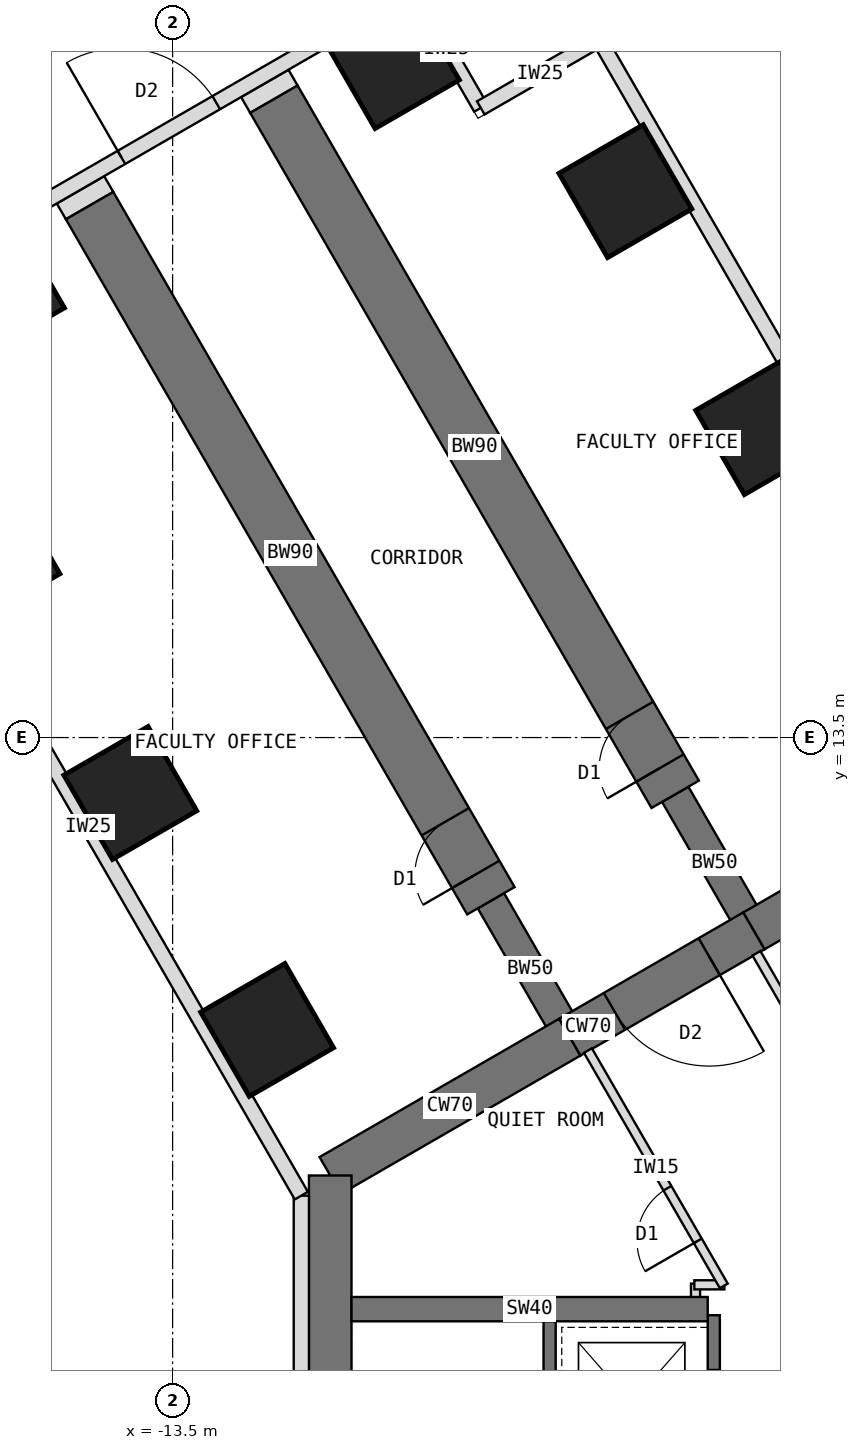
"""IFC4 building model, lengths in metres.
Left out: names, types, materials, properties, quantities, classifications, styles, units other than length and angle.
Written with IfcOpenShell. Run it as: python <this file> out.ifc"""

import sys

from ifc_helpers import new_model, si_unit, direction, frame, frame_2d, origin, origin_2d, place, context, subcontext, project, spatial, rectangle, extrude, element, fill, save


model = new_model("IFC4")
c1 = context("Model", 3, precision=1e-05, world=origin(), true_north=direction((0.0, 1.0)))
c2 = subcontext(c1, "Body", "Model", "MODEL_VIEW")
j1 = project(units=[si_unit("LENGTHUNIT", "METRE"), si_unit("PLANEANGLEUNIT", "RADIAN")], contexts=[c1])
p1 = place(None, origin())
s1 = spatial("IfcSite", under=j1, at=p1, CompositionType="ELEMENT")
p2 = place(p1, origin())
s2 = spatial("IfcBuilding", under=s1, at=p2, CompositionType="ELEMENT")
p3 = place(p2, frame((0.0, 0.0, 5.5)))
s3 = spatial("IfcBuildingStorey", under=s2, at=p3, CompositionType="ELEMENT", Elevation=5.5)
p4 = place(p3, frame((0.0, 12.596, 0.0), z_axis=(0.0, 0.0, 1.0), x_axis=(-0.866011268655, -0.500024481964, 0.0)))
e1 = element("IfcWall", 1, at=p4, inside=s3, PredefinedType="SHEAR", context=c2, shape_type="SweptSolid", body=[
    extrude(rectangle(XDim=4.548, YDim=0.7, at=frame_2d((2.274, 0.0))), origin(), (0.0, 0.0, 1.0), 5.0),
])
p5 = place(p3, frame((-3.939, 10.322, 0.0), z_axis=(0.0, 0.0, 1.0), x_axis=(-0.866019471182, -0.500010275428, 0.0)))
e2 = element("IfcWall", 2, at=p5, inside=s3, PredefinedType="SHEAR", context=c2, shape_type="SweptSolid", body=[
    extrude(rectangle(XDim=3.5, YDim=0.7, at=frame_2d((1.75, 0.0))), origin(), (0.0, 0.0, 1.0), 5.0),
])
p6 = place(p5, frame((0.85, 0.0, 0.0)))
e3 = element("IfcOpeningElement", 3, at=p6, cuts=e2, PredefinedType="OPENING", context=c2, shape_type="SweptSolid", body=[
    extrude(rectangle(XDim=1.8, YDim=2.1, at=frame_2d((0.9, 1.05))), frame((0.0, 0.36, 0.0), z_axis=(0.0, -1.0, 0.0), x_axis=(1.0, 0.0, 0.0)), (0.0, 0.0, 1.0), 0.72),
])
p7 = place(p3, frame((-6.97, 8.572, 0.0), z_axis=(0.0, 0.0, 1.0), x_axis=(-0.866034513004, -0.499984222037, 0.0)))
e4 = element("IfcWall", 4, at=p7, inside=s3, PredefinedType="SHEAR", context=c2, shape_type="SweptSolid", body=[
    extrude(rectangle(XDim=4.548, YDim=0.7, at=frame_2d((2.274, 0.0))), origin(), (0.0, 0.0, 1.0), 5.0),
])
p8 = place(p3, frame((-10.908, 6.298, 0.0), z_axis=(0.0, 0.0, 1.0), x_axis=(0.0, -1.0, 0.0)))
e5 = element("IfcWall", 5, at=p8, inside=s3, PredefinedType="SHEAR", context=c2, shape_type="SweptSolid", body=[
    extrude(rectangle(XDim=12.596, YDim=0.7, at=frame_2d((6.298, 0.0))), origin(), (0.0, 0.0, 1.0), 5.0),
])
p9 = place(p3, frame((-6.97, 8.572, 0.0), z_axis=(0.0, 0.0, 1.0), x_axis=(-0.499988811324, 0.866031863473, 0.0)))
e6 = element("IfcWall", 6, at=p9, inside=s3, PredefinedType="SHEAR", context=c2, shape_type="SweptSolid", body=[
    extrude(rectangle(XDim=2.592, YDim=0.5, at=frame_2d((1.296, 0.0))), origin(), (0.0, 0.0, 1.0), 5.0),
])
p10 = place(p3, frame((-8.266, 10.816, 0.0), z_axis=(0.0, 0.0, 1.0), x_axis=(-0.499996231654, 0.866027579429, 0.0)))
e7 = element("IfcWall", 7, at=p10, inside=s3, PredefinedType="SHEAR", context=c2, shape_type="SweptSolid", body=[
    extrude(rectangle(XDim=13.2, YDim=0.9, at=frame_2d((6.6, 0.0))), origin(), (0.0, 0.0, 1.0), 5.0),
])
p11 = place(p10, frame((0.5, 0.0, 0.0)))
e8 = element("IfcOpeningElement", 8, at=p11, cuts=e7, PredefinedType="OPENING", context=c2, shape_type="SweptSolid", body=[
    extrude(rectangle(XDim=1.0, YDim=2.1, at=frame_2d((0.5, 1.05))), frame((0.0, 0.46, 0.0), z_axis=(0.0, -1.0, 0.0), x_axis=(1.0, 0.0, 0.0)), (0.0, 0.0, 1.0), 0.92),
])
p12 = place(p3, frame((-3.939, 10.322, 0.0), z_axis=(0.0, 0.0, 1.0), x_axis=(-0.499918158782, 0.866072649678, 0.0)))
e9 = element("IfcWall", 9, at=p12, inside=s3, PredefinedType="SHEAR", context=c2, shape_type="SweptSolid", body=[
    extrude(rectangle(XDim=2.592, YDim=0.5, at=frame_2d((1.296, 0.0))), origin(), (0.0, 0.0, 1.0), 5.0),
])
p13 = place(p3, frame((-5.234, 12.566, 0.0), z_axis=(0.0, 0.0, 1.0), x_axis=(-0.500010103361, 0.866019570528, 0.0)))
e10 = element("IfcWall", 10, at=p13, inside=s3, PredefinedType="SHEAR", context=c2, shape_type="SweptSolid", body=[
    extrude(rectangle(XDim=13.2, YDim=0.9, at=frame_2d((6.6, 0.0))), origin(), (0.0, 0.0, 1.0), 5.0),
])
p14 = place(p13, frame((0.5, 0.0, 0.0)))
e11 = element("IfcOpeningElement", 11, at=p14, cuts=e10, PredefinedType="OPENING", context=c2, shape_type="SweptSolid", body=[
    extrude(rectangle(XDim=1.0, YDim=2.1, at=frame_2d((0.5, 1.05))), frame((0.0, 0.46, 0.0), z_axis=(0.0, -1.0, 0.0), x_axis=(1.0, 0.0, 0.0)), (0.0, 0.0, 1.0), 0.92),
])
for number, where, z_axis, x_axis in (
    (12, (-11.946, 8.691, 0.0), (0.0, 0.0, 1.0), (0.866, 0.5, 0.0)),
    (13, (-14.196, 12.588, 0.0), (0.0, 0.0, 1.0), (0.866, 0.5, 0.0)),
    (14, (-3.804, 18.588, 0.0), (0.0, 0.0, 1.0), (0.866, 0.5, 0.0)),
    (15, (-16.446, 16.486, 0.0), (0.0, 0.0, 1.0), (0.866, 0.5, 0.0)),
    (16, (-6.054, 22.486, 0.0), (0.0, 0.0, 1.0), (0.866, 0.5, 0.0)),
    (17, (-16.373, 20.858, 0.0), (0.0, 0.0, 1.0), (0.866, 0.5, 0.0)),
    (18, (-9.877, 24.608, 0.0), (0.0, 0.0, 1.0), (0.866, 0.5, 0.0)),
):
    element("IfcColumn", number, at=place(p3, frame(where, z_axis=z_axis, x_axis=x_axis)), inside=s3, PredefinedType="COLUMN", context=c2, shape_type="SweptSolid", body=[
        extrude(rectangle(XDim=1.6, YDim=1.6, at=origin_2d()), origin(), (0.0, 0.0, 1.0), 5.0),
    ])
p15 = place(p3, frame((-14.865, 22.248, 0.0), z_axis=(0.0, 0.0, 1.0), x_axis=(-0.500426713919, 0.865778900179, 0.0)))
e19 = element("IfcWall", 19, at=p15, inside=s3, PredefinedType="PARTITIONING", context=c2, shape_type="SweptSolid", body=[
    extrude(rectangle(XDim=0.3, YDim=0.9, at=frame_2d((0.15, 0.0))), origin(), (0.0, 0.0, 1.0), 4.65),
])
p16 = place(p3, frame((-11.834, 23.998, 0.0), z_axis=(0.0, 0.0, 1.0), x_axis=(-0.499816412211, 0.866131372301, 0.0)))
e20 = element("IfcWall", 20, at=p16, inside=s3, PredefinedType="PARTITIONING", context=c2, shape_type="SweptSolid", body=[
    extrude(rectangle(XDim=0.3, YDim=0.9, at=frame_2d((0.15, 0.0))), origin(), (0.0, 0.0, 1.0), 4.65),
])
p17 = place(p3, frame((-4.6, 4.0, 0.0), z_axis=(0.0, 0.0, 1.0), x_axis=(0.0, -1.0, 0.0)))
e21 = element("IfcWall", 21, at=p17, inside=s3, PredefinedType="SHEAR", context=c2, shape_type="SweptSolid", body=[
    extrude(rectangle(XDim=8.0, YDim=0.2, at=frame_2d((4.0, 0.0))), origin(), (0.0, 0.0, 1.0), 5.0),
])
p18 = place(p17, frame((6.3, 0.0, 0.0)))
e22 = element("IfcOpeningElement", 22, at=p18, cuts=e21, PredefinedType="OPENING", context=c2, shape_type="SweptSolid", body=[
    extrude(rectangle(XDim=1.2, YDim=2.1, at=frame_2d((0.6, 1.05))), frame((0.0, 0.11, 0.0), z_axis=(0.0, -1.0, 0.0), x_axis=(1.0, 0.0, 0.0)), (0.0, 0.0, 1.0), 0.22),
])
p19 = place(p17, frame((0.9, 0.0, 0.0)))
e23 = element("IfcOpeningElement", 23, at=p19, cuts=e21, PredefinedType="OPENING", context=c2, shape_type="SweptSolid", body=[
    extrude(rectangle(XDim=1.1, YDim=2.2, at=frame_2d((0.55, 1.1))), frame((0.0, 0.11, 0.0), z_axis=(0.0, -1.0, 0.0), x_axis=(1.0, 0.0, 0.0)), (0.0, 0.0, 1.0), 0.22),
])
p20 = place(p3, frame((-7.3, 4.0, 0.0), z_axis=(0.0, 0.0, 1.0), x_axis=(0.0, -1.0, 0.0)))
e24 = element("IfcWall", 24, at=p20, inside=s3, PredefinedType="SHEAR", context=c2, shape_type="SweptSolid", body=[
    extrude(rectangle(XDim=8.0, YDim=0.2, at=frame_2d((4.0, 0.0))), origin(), (0.0, 0.0, 1.0), 5.0),
])
p21 = place(p20, frame((6.7, 0.0, 0.0)))
e25 = element("IfcOpeningElement", 25, at=p21, cuts=e24, PredefinedType="OPENING", context=c2, shape_type="SweptSolid", body=[
    extrude(rectangle(XDim=1.1, YDim=2.1, at=frame_2d((0.55, 1.05))), frame((0.0, 0.11, 0.0), z_axis=(0.0, -1.0, 0.0), x_axis=(1.0, 0.0, 0.0)), (0.0, 0.0, 1.0), 0.22),
])
p22 = place(p3, frame((-4.7, 4.1, 0.0), z_axis=(0.0, 0.0, 1.0), x_axis=(-1.0, 0.0, 0.0)))
e26 = element("IfcWall", 26, at=p22, inside=s3, PredefinedType="SHEAR", context=c2, shape_type="SweptSolid", body=[
    extrude(rectangle(XDim=5.858, YDim=0.4, at=frame_2d((2.929, 0.0))), origin(), (0.0, 0.0, 1.0), 5.0),
])
p23 = place(p3, frame((-4.9, 4.09, 0.0), z_axis=(0.0, 0.0, 1.0), x_axis=(0.0, 1.0, 0.0)))
e27 = element("IfcWall", 27, at=p23, inside=s3, PredefinedType="PARTITIONING", context=c2, shape_type="SweptSolid", body=[
    extrude(rectangle(XDim=0.43, YDim=0.15, at=frame_2d((0.215, 0.0))), origin(), (0.0, 0.0, 1.0), 4.65),
])
p24 = place(p3, frame((-4.92, 4.5, 0.0), z_axis=(0.0, 0.0, 1.0), x_axis=(1.0, 0.0, 0.0)))
e28 = element("IfcWall", 28, at=p24, inside=s3, PredefinedType="PARTITIONING", context=c2, shape_type="SweptSolid", body=[
    extrude(rectangle(XDim=0.494, YDim=0.15, at=frame_2d((0.247, 0.0))), origin(), (0.0, 0.0, 1.0), 4.65),
])
p25 = place(p3, frame((-4.436, 4.483, 0.0), z_axis=(0.0, 0.0, 1.0), x_axis=(-0.500017246033, 0.866015446554, 0.0)))
e29 = element("IfcWall", 29, at=p25, inside=s3, PredefinedType="PARTITIONING", context=c2, shape_type="SweptSolid", body=[
    extrude(rectangle(XDim=4.469, YDim=0.15, at=frame_2d((2.234, 0.0))), origin(), (0.0, 0.0, 1.0), 4.65),
])
p26 = place(p25, frame((0.855, 0.0, 0.0)))
e30 = element("IfcOpeningElement", 30, at=p26, cuts=e29, PredefinedType="OPENING", context=c2, shape_type="SweptSolid", body=[
    extrude(rectangle(XDim=1.0, YDim=2.1, at=frame_2d((0.5, 1.05))), frame((0.0, 0.085, 0.0), z_axis=(0.0, -1.0, 0.0), x_axis=(1.0, 0.0, 0.0)), (0.0, 0.0, 1.0), 0.17),
])
p27 = place(p3, frame((-3.898, 9.952, 0.0), z_axis=(0.0, 0.0, 1.0), x_axis=(0.499999927604, -0.866025445582, 0.0)))
e31 = element("IfcWall", 31, at=p27, inside=s3, PredefinedType="PARTITIONING", context=c2, shape_type="SweptSolid", body=[
    extrude(rectangle(XDim=4.468, YDim=0.15, at=frame_2d((2.234, 0.0))), origin(), (0.0, 0.0, 1.0), 4.65),
])
p28 = place(p27, frame((2.614, 0.0, 0.0)))
e32 = element("IfcOpeningElement", 32, at=p28, cuts=e31, PredefinedType="OPENING", context=c2, shape_type="SweptSolid", body=[
    extrude(rectangle(XDim=1.0, YDim=2.1, at=frame_2d((0.5, 1.05))), frame((0.0, 0.085, 0.0), z_axis=(0.0, -1.0, 0.0), x_axis=(1.0, 0.0, 0.0)), (0.0, 0.0, 1.0), 0.17),
])
p29 = place(p3, frame((-11.383, -5.967, 0.0), z_axis=(0.0, 0.0, 1.0), x_axis=(0.0, 1.0, 0.0)))
e33 = element("IfcWall", 33, at=p29, inside=s3, PredefinedType="STANDARD", context=c2, shape_type="SweptSolid", body=[
    extrude(rectangle(XDim=11.933, YDim=0.25, at=frame_2d((5.967, 0.0))), origin(), (0.0, 0.0, 1.0), 4.65),
])
p30 = place(p3, frame((-11.383, 5.967, 0.0), z_axis=(0.0, 0.0, 1.0), x_axis=(-0.499996367808, 0.866027500821, 0.0)))
e34 = element("IfcWall", 34, at=p30, inside=s3, PredefinedType="STANDARD", context=c2, shape_type="SweptSolid", body=[
    extrude(rectangle(XDim=14.016, YDim=0.25, at=frame_2d((7.008, 0.0))), origin(), (0.0, 0.0, 1.0), 4.65),
])
p31 = place(p3, frame((-17.568, 21.178, 0.0), z_axis=(0.0, 0.0, 1.0), x_axis=(0.866025598446, 0.499999662836, 0.0)))
e35 = element("IfcWall", 35, at=p31, inside=s3, PredefinedType="STANDARD", context=c2, shape_type="SweptSolid", body=[
    extrude(rectangle(XDim=9.25, YDim=0.25, at=frame_2d((4.625, 0.0))), origin(), (0.0, 0.0, 1.0), 4.65),
])
p32 = place(p31, frame((3.725, 0.0, 0.0)))
e36 = element("IfcOpeningElement", 36, at=p32, cuts=e35, PredefinedType="OPENING", context=c2, shape_type="SweptSolid", body=[
    extrude(rectangle(XDim=1.8, YDim=2.1, at=frame_2d((0.9, 1.05))), frame((0.0, 0.135, 0.0), z_axis=(0.0, -1.0, 0.0), x_axis=(1.0, 0.0, 0.0)), (0.0, 0.0, 1.0), 0.27),
])
for number, where, z_axis, x_axis in (
    (37, (-9.557, 25.803, 0.0), (0.0, 0.0, 1.0), (0.5, -0.866, 0.0)),
    (38, (-8.432, 23.855, 0.0), (0.0, 0.0, 1.0), (0.866, 0.5, 0.0)),
):
    element("IfcWall", number, at=place(p3, frame(where, z_axis=z_axis, x_axis=x_axis)), inside=s3, PredefinedType="STANDARD", context=c2, shape_type="SweptSolid", body=[
        extrude(rectangle(XDim=2.25, YDim=0.25, at=frame_2d((1.125, 0.0))), origin(), (0.0, 0.0, 1.0), 4.65),
    ])
p33 = place(p3, frame((-6.484, 24.98, 0.0), z_axis=(0.0, 0.0, 1.0), x_axis=(0.499996367808, -0.866027500821, 0.0)))
e39 = element("IfcWall", 39, at=p33, inside=s3, PredefinedType="STANDARD", context=c2, shape_type="SweptSolid", body=[
    extrude(rectangle(XDim=14.016, YDim=0.25, at=frame_2d((7.008, 0.0))), origin(), (0.0, 0.0, 1.0), 4.65),
])
p34 = place(p6, origin())
e40 = element("IfcDoor", 40, at=p34, inside=s3, OperationType="DOUBLE_DOOR_DOUBLE_SWING", PredefinedType="DOOR", context=c2, shape_type="SweptSolid", body=[
    extrude(rectangle(XDim=1.72, YDim=2.06, at=frame_2d((0.9, 1.03))), frame((0.0, 0.025, 0.0), z_axis=(0.0, -1.0, 0.0), x_axis=(1.0, 0.0, 0.0)), (0.0, 0.0, 1.0), 0.05),
    extrude(rectangle(XDim=0.04, YDim=2.1, at=frame_2d((0.02, 1.05))), frame((0.0, 0.35, 0.0), z_axis=(0.0, -1.0, 0.0), x_axis=(1.0, 0.0, 0.0)), (0.0, 0.0, 1.0), 0.699),
    extrude(rectangle(XDim=0.04, YDim=2.1, at=frame_2d((1.78, 1.05))), frame((0.0, 0.35, 0.0), z_axis=(0.0, -1.0, 0.0), x_axis=(1.0, 0.0, 0.0)), (0.0, 0.0, 1.0), 0.699),
    extrude(rectangle(XDim=1.72, YDim=0.04, at=frame_2d((0.9, 2.08))), frame((0.0, 0.35, 0.0), z_axis=(0.0, -1.0, 0.0), x_axis=(1.0, 0.0, 0.0)), (0.0, 0.0, 1.0), 0.699),
])
fill(e3, e40)
p35 = place(p26, origin())
e41 = element("IfcDoor", 41, at=p35, inside=s3, OperationType="SINGLE_SWING_LEFT", PredefinedType="DOOR", context=c2, shape_type="SweptSolid", body=[
    extrude(rectangle(XDim=1.0, YDim=2.1, at=frame_2d((0.5, 1.05))), frame((0.0, 0.025, 0.0), z_axis=(0.0, -1.0, 0.0), x_axis=(1.0, 0.0, 0.0)), (0.0, 0.0, 1.0), 0.05),
])
fill(e30, e41)
p36 = place(p11, origin())
e42 = element("IfcDoor", 42, at=p36, inside=s3, OperationType="SINGLE_SWING_LEFT", PredefinedType="DOOR", context=c2, shape_type="SweptSolid", body=[
    extrude(rectangle(XDim=0.92, YDim=2.06, at=frame_2d((0.5, 1.03))), frame((0.0, 0.025, 0.0), z_axis=(0.0, -1.0, 0.0), x_axis=(1.0, 0.0, 0.0)), (0.0, 0.0, 1.0), 0.05),
    extrude(rectangle(XDim=0.04, YDim=2.1, at=frame_2d((0.02, 1.05))), frame((0.0, 0.45, 0.0), z_axis=(0.0, -1.0, 0.0), x_axis=(1.0, 0.0, 0.0)), (0.0, 0.0, 1.0), 0.899),
    extrude(rectangle(XDim=0.04, YDim=2.1, at=frame_2d((0.98, 1.05))), frame((0.0, 0.45, 0.0), z_axis=(0.0, -1.0, 0.0), x_axis=(1.0, 0.0, 0.0)), (0.0, 0.0, 1.0), 0.899),
    extrude(rectangle(XDim=0.92, YDim=0.04, at=frame_2d((0.5, 2.08))), frame((0.0, 0.45, 0.0), z_axis=(0.0, -1.0, 0.0), x_axis=(1.0, 0.0, 0.0)), (0.0, 0.0, 1.0), 0.899),
])
fill(e8, e42)
p37 = place(p14, origin())
e43 = element("IfcDoor", 43, at=p37, inside=s3, OperationType="SINGLE_SWING_LEFT", PredefinedType="DOOR", context=c2, shape_type="SweptSolid", body=[
    extrude(rectangle(XDim=0.92, YDim=2.06, at=frame_2d((0.5, 1.03))), frame((0.0, 0.025, 0.0), z_axis=(0.0, -1.0, 0.0), x_axis=(1.0, 0.0, 0.0)), (0.0, 0.0, 1.0), 0.05),
    extrude(rectangle(XDim=0.04, YDim=2.1, at=frame_2d((0.02, 1.05))), frame((0.0, 0.45, 0.0), z_axis=(0.0, -1.0, 0.0), x_axis=(1.0, 0.0, 0.0)), (0.0, 0.0, 1.0), 0.899),
    extrude(rectangle(XDim=0.04, YDim=2.1, at=frame_2d((0.98, 1.05))), frame((0.0, 0.45, 0.0), z_axis=(0.0, -1.0, 0.0), x_axis=(1.0, 0.0, 0.0)), (0.0, 0.0, 1.0), 0.899),
    extrude(rectangle(XDim=0.92, YDim=0.04, at=frame_2d((0.5, 2.08))), frame((0.0, 0.45, 0.0), z_axis=(0.0, -1.0, 0.0), x_axis=(1.0, 0.0, 0.0)), (0.0, 0.0, 1.0), 0.899),
])
fill(e11, e43)
p38 = place(p32, origin())
e44 = element("IfcDoor", 44, at=p38, inside=s3, OperationType="DOUBLE_DOOR_DOUBLE_SWING", PredefinedType="DOOR", context=c2, shape_type="SweptSolid", body=[
    extrude(rectangle(XDim=1.8, YDim=2.1, at=frame_2d((0.9, 1.05))), frame((0.0, 0.025, 0.0), z_axis=(0.0, -1.0, 0.0), x_axis=(1.0, 0.0, 0.0)), (0.0, 0.0, 1.0), 0.05),
])
fill(e36, e44)
save(model, sys.argv[1])
